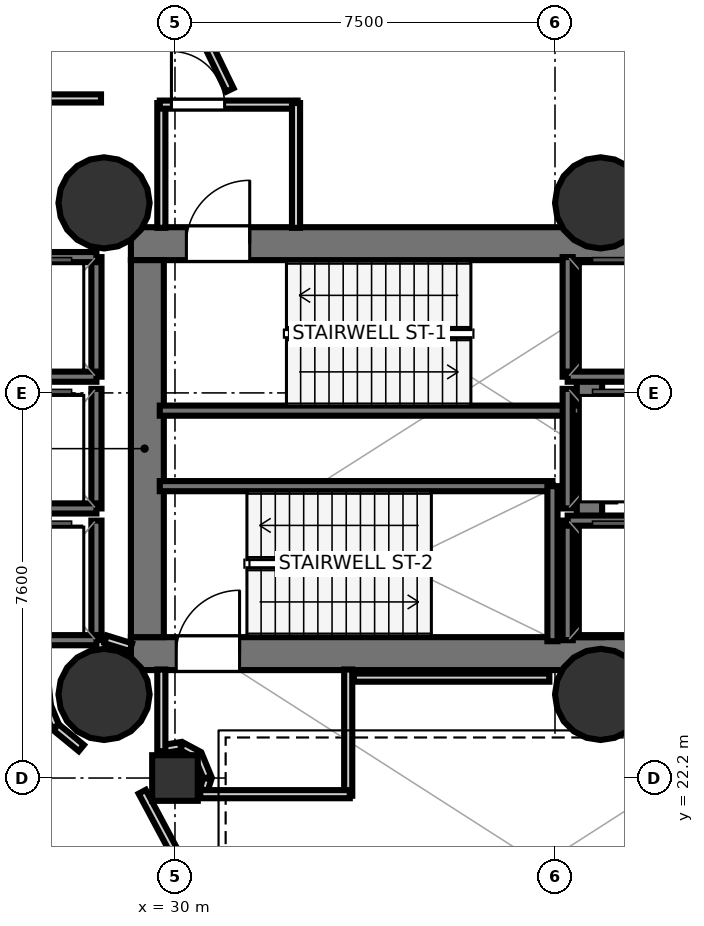
"""IFC4 building model, lengths in metres.
Left out: names, types, materials, properties, quantities, classifications, styles, units other than length and angle.
Written with IfcOpenShell. Run it as: python <this file> out.ifc"""

import sys

from ifc_helpers import new_model, si_unit, direction, frame, frame_2d, origin, origin_2d, place, context, subcontext, project, spatial, rectangle, hollow_circle, extrude, element, fill, save


model = new_model("IFC4")
c1 = context("Model", 3, precision=1e-05, world=origin(), true_north=direction((0.0, 1.0)))
c2 = subcontext(c1, "Body", "Model", "MODEL_VIEW")
j1 = project(units=[si_unit("LENGTHUNIT", "METRE"), si_unit("PLANEANGLEUNIT", "RADIAN")], contexts=[c1])
p1 = place(None, origin())
s1 = spatial("IfcSite", under=j1, at=p1, CompositionType="ELEMENT")
p2 = place(p1, origin())
s2 = spatial("IfcBuilding", under=s1, at=p2, CompositionType="ELEMENT")
p3 = place(p2, frame((0.0, 0.0, 11.0)))
s3 = spatial("IfcBuildingStorey", under=s2, at=p3, CompositionType="ELEMENT", Elevation=11.0)
p4 = place(p3, frame((29.13, 32.745, 0.0), z_axis=(0.0, 0.0, 1.0), x_axis=(1.0, 0.0, 0.0)))
e1 = element("IfcWall", 1, at=p4, inside=s3, PredefinedType="SHEAR", context=c2, shape_type="SweptSolid", body=[
    extrude(rectangle(XDim=10.72, YDim=0.65, at=frame_2d((5.36, 0.0))), origin(), (0.0, 0.0, 1.0), 4.58),
])
p5 = place(p4, frame((1.095, 0.0, 0.0)))
e2 = element("IfcOpeningElement", 2, at=p5, cuts=e1, PredefinedType="OPENING", context=c2, shape_type="SweptSolid", body=[
    extrude(rectangle(XDim=1.25, YDim=2.15, at=frame_2d((0.625, 1.075))), frame((0.0, 0.335, 0.0), z_axis=(0.0, -1.0, 0.0), x_axis=(1.0, 0.0, 0.0)), (0.0, 0.0, 1.0), 0.67),
])
p6 = place(p3, frame((29.13, 24.655, 0.0), z_axis=(0.0, 0.0, 1.0), x_axis=(1.0, 0.0, 0.0)))
e3 = element("IfcWall", 3, at=p6, inside=s3, PredefinedType="SHEAR", context=c2, shape_type="SweptSolid", body=[
    extrude(rectangle(XDim=10.72, YDim=0.65, at=frame_2d((5.36, 0.0))), origin(), (0.0, 0.0, 1.0), 4.58),
])
p7 = place(p6, frame((0.895, 0.0, 0.0)))
e4 = element("IfcOpeningElement", 4, at=p7, cuts=e3, PredefinedType="OPENING", context=c2, shape_type="SweptSolid", body=[
    extrude(rectangle(XDim=1.25, YDim=2.15, at=frame_2d((0.625, 1.075))), frame((0.0, 0.335, 0.0), z_axis=(0.0, -1.0, 0.0), x_axis=(1.0, 0.0, 0.0)), (0.0, 0.0, 1.0), 0.67),
])
p8 = place(p3, frame((29.455, 24.98, 0.0), z_axis=(0.0, 0.0, 1.0), x_axis=(0.0, 1.0, 0.0)))
e5 = element("IfcWall", 5, at=p8, inside=s3, PredefinedType="SHEAR", context=c2, shape_type="SweptSolid", body=[
    extrude(rectangle(XDim=7.44, YDim=0.65, at=frame_2d((3.72, 0.0))), origin(), (0.0, 0.0, 1.0), 4.58),
])
p9 = place(p3, frame((38.18, 24.98, 0.0), z_axis=(0.0, 0.0, 1.0), x_axis=(0.0, 1.0, 0.0)))
e6 = element("IfcWall", 6, at=p9, inside=s3, PredefinedType="SHEAR", context=c2, shape_type="SweptSolid", body=[
    extrude(rectangle(XDim=7.44, YDim=0.5, at=frame_2d((3.72, 0.0))), origin(), (0.0, 0.0, 1.0), 4.58),
])
for number, where, z_axis, x_axis in (
    (7, (28.6, 33.55, 0.0), (0.0, 0.0, 1.0), (1.0, 0.0, 0.0)),
    (8, (28.6, 23.85, 0.0), (0.0, 0.0, 1.0), (1.0, 0.0, 0.0)),
    (9, (38.4, 33.55, 0.0), (0.0, 0.0, 1.0), (1.0, 0.0, 0.0)),
    (10, (38.4, 23.85, 0.0), (0.0, 0.0, 1.0), (1.0, 0.0, 0.0)),
):
    element("IfcColumn", number, at=place(p3, frame(where, z_axis=z_axis, x_axis=x_axis)), inside=s3, PredefinedType="COLUMN", context=c2, shape_type="SweptSolid", body=[
        extrude(hollow_circle(Radius=0.9, WallThickness=0.045, at=origin_2d()), origin(), (0.0, 0.0, 1.0), 4.8),
    ])
p10 = place(p3, frame((30.0, 22.2, 0.0), z_axis=(0.0, 0.0, 1.0), x_axis=(1.0, 0.0, 0.0)))
e11 = element("IfcColumn", 11, at=p10, inside=s3, PredefinedType="COLUMN", context=c2, shape_type="SweptSolid", body=[
    extrude(rectangle(XDim=0.9, YDim=0.9, at=origin_2d()), origin(), (0.0, 0.0, 1.0), 4.8),
])
p11 = place(p3, frame((29.7, 29.45, 0.0), z_axis=(0.0, 0.0, 1.0), x_axis=(1.0, 0.0, 0.0)))
e12 = element("IfcWall", 12, at=p11, inside=s3, PredefinedType="SOLIDWALL", context=c2, shape_type="SweptSolid", body=[
    extrude(rectangle(XDim=8.3, YDim=0.2, at=frame_2d((4.15, 0.0))), origin(), (0.0, 0.0, 1.0), 4.58),
])
p12 = place(p3, frame((29.7, 27.96, 0.0), z_axis=(0.0, 0.0, 1.0), x_axis=(1.0, 0.0, 0.0)))
e13 = element("IfcWall", 13, at=p12, inside=s3, PredefinedType="SOLIDWALL", context=c2, shape_type="SweptSolid", body=[
    extrude(rectangle(XDim=7.75, YDim=0.2, at=frame_2d((3.875, 0.0))), origin(), (0.0, 0.0, 1.0), 4.58),
])
p13 = place(p3, frame((37.45, 24.9, 0.0), z_axis=(0.0, 0.0, 1.0), x_axis=(0.0, 1.0, 0.0)))
e14 = element("IfcWall", 14, at=p13, inside=s3, PredefinedType="SOLIDWALL", context=c2, shape_type="SweptSolid", body=[
    extrude(rectangle(XDim=3.06, YDim=0.2, at=frame_2d((1.53, 0.0))), origin(), (0.0, 0.0, 1.0), 4.58),
])
p14 = place(p3, frame((37.75, 30.12, 0.0), z_axis=(0.0, 0.0, 1.0), x_axis=(0.0, 1.0, 0.0)))
e15 = element("IfcWall", 15, at=p14, inside=s3, PredefinedType="SOLIDWALL", context=c2, shape_type="SweptSolid", body=[
    extrude(rectangle(XDim=2.36, YDim=0.2, at=frame_2d((1.18, 0.0))), origin(), (0.0, 0.0, 1.0), 4.58),
])
p15 = place(p3, frame((37.75, 30.12, 0.0), z_axis=(0.0, 0.0, 1.0), x_axis=(1.0, 0.0, 0.0)))
e16 = element("IfcWall", 16, at=p15, inside=s3, PredefinedType="SOLIDWALL", context=c2, shape_type="SweptSolid", body=[
    extrude(rectangle(XDim=2.1, YDim=0.2, at=frame_2d((1.05, 0.0))), origin(), (0.0, 0.0, 1.0), 4.58),
])
p16 = place(p3, frame((37.75, 24.92, 0.0), z_axis=(0.0, 0.0, 1.0), x_axis=(0.0, 1.0, 0.0)))
e17 = element("IfcWall", 17, at=p16, inside=s3, PredefinedType="SOLIDWALL", context=c2, shape_type="SweptSolid", body=[
    extrude(rectangle(XDim=2.36, YDim=0.2, at=frame_2d((1.18, 0.0))), origin(), (0.0, 0.0, 1.0), 4.58),
])
p17 = place(p3, frame((37.75, 27.28, 0.0), z_axis=(0.0, 0.0, 1.0), x_axis=(1.0, 0.0, 0.0)))
e18 = element("IfcWall", 18, at=p17, inside=s3, PredefinedType="SOLIDWALL", context=c2, shape_type="SweptSolid", body=[
    extrude(rectangle(XDim=2.1, YDim=0.2, at=frame_2d((1.05, 0.0))), origin(), (0.0, 0.0, 1.0), 4.58),
])
p18 = place(p3, frame((28.45, 30.12, 0.0), z_axis=(0.0, 0.0, 1.0), x_axis=(0.0, 1.0, 0.0)))
e19 = element("IfcWall", 19, at=p18, inside=s3, PredefinedType="SOLIDWALL", context=c2, shape_type="SweptSolid", body=[
    extrude(rectangle(XDim=2.36, YDim=0.2, at=frame_2d((1.18, 0.0))), origin(), (0.0, 0.0, 1.0), 4.58),
])
for number, where, z_axis, x_axis in (
    (20, (26.35, 32.48, 0.0), (0.0, 0.0, 1.0), (1.0, 0.0, 0.0)),
    (21, (26.35, 30.12, 0.0), (0.0, 0.0, 1.0), (1.0, 0.0, 0.0)),
):
    element("IfcWall", number, at=place(p3, frame(where, z_axis=z_axis, x_axis=x_axis)), inside=s3, PredefinedType="SOLIDWALL", context=c2, shape_type="SweptSolid", body=[
        extrude(rectangle(XDim=2.1, YDim=0.2, at=frame_2d((1.05, 0.0))), origin(), (0.0, 0.0, 1.0), 4.58),
    ])
p19 = place(p3, frame((28.45, 27.52, 0.0), z_axis=(0.0, 0.0, 1.0), x_axis=(0.0, 1.0, 0.0)))
e22 = element("IfcWall", 22, at=p19, inside=s3, PredefinedType="SOLIDWALL", context=c2, shape_type="SweptSolid", body=[
    extrude(rectangle(XDim=2.36, YDim=0.2, at=frame_2d((1.18, 0.0))), origin(), (0.0, 0.0, 1.0), 4.58),
])
p20 = place(p3, frame((26.35, 27.52, 0.0), z_axis=(0.0, 0.0, 1.0), x_axis=(1.0, 0.0, 0.0)))
e23 = element("IfcWall", 23, at=p20, inside=s3, PredefinedType="SOLIDWALL", context=c2, shape_type="SweptSolid", body=[
    extrude(rectangle(XDim=2.1, YDim=0.2, at=frame_2d((1.05, 0.0))), origin(), (0.0, 0.0, 1.0), 4.58),
])
p21 = place(p3, frame((28.45, 24.92, 0.0), z_axis=(0.0, 0.0, 1.0), x_axis=(0.0, 1.0, 0.0)))
e24 = element("IfcWall", 24, at=p21, inside=s3, PredefinedType="SOLIDWALL", context=c2, shape_type="SweptSolid", body=[
    extrude(rectangle(XDim=2.36, YDim=0.2, at=frame_2d((1.18, 0.0))), origin(), (0.0, 0.0, 1.0), 4.58),
])
p22 = place(p3, frame((26.35, 24.92, 0.0), z_axis=(0.0, 0.0, 1.0), x_axis=(1.0, 0.0, 0.0)))
e25 = element("IfcWall", 25, at=p22, inside=s3, PredefinedType="SOLIDWALL", context=c2, shape_type="SweptSolid", body=[
    extrude(rectangle(XDim=2.1, YDim=0.2, at=frame_2d((1.05, 0.0))), origin(), (0.0, 0.0, 1.0), 4.58),
])
p23 = place(p3, frame((37.75, 27.52, 0.0), z_axis=(0.0, 0.0, 1.0), x_axis=(0.0, 1.0, 0.0)))
e26 = element("IfcWall", 26, at=p23, inside=s3, PredefinedType="SOLIDWALL", context=c2, shape_type="SweptSolid", body=[
    extrude(rectangle(XDim=2.36, YDim=0.2, at=frame_2d((1.18, 0.0))), origin(), (0.0, 0.0, 1.0), 4.58),
])
p24 = place(p3, frame((29.731, 33.058, 0.0), z_axis=(0.0, 0.0, 1.0), x_axis=(0.0, 1.0, 0.0)))
e27 = element("IfcWall", 27, at=p24, inside=s3, PredefinedType="PARTITIONING", context=c2, shape_type="SweptSolid", body=[
    extrude(rectangle(XDim=2.462, YDim=0.16, at=frame_2d((1.231, 0.0))), origin(), (0.0, 0.0, 1.0), 3.1),
])
p25 = place(p3, frame((29.7, 35.489, 0.0), z_axis=(0.0, 0.0, 1.0), x_axis=(1.0, 0.0, 0.0)))
e28 = element("IfcWall", 28, at=p25, inside=s3, PredefinedType="PARTITIONING", context=c2, shape_type="SweptSolid", body=[
    extrude(rectangle(XDim=2.72, YDim=0.16, at=frame_2d((1.36, 0.0))), origin(), (0.0, 0.0, 1.0), 3.1),
])
p26 = place(p25, frame((0.23, 0.0, 0.0)))
e29 = element("IfcOpeningElement", 29, at=p26, cuts=e28, PredefinedType="OPENING", context=c2, shape_type="SweptSolid", body=[
    extrude(rectangle(XDim=1.05, YDim=2.15, at=frame_2d((0.525, 1.075))), frame((0.0, 0.09, 0.0), z_axis=(0.0, -1.0, 0.0), x_axis=(1.0, 0.0, 0.0)), (0.0, 0.0, 1.0), 0.18),
])
p27 = place(p3, frame((32.389, 35.52, 0.0), z_axis=(0.0, 0.0, 1.0), x_axis=(0.0, -1.0, 0.0)))
e30 = element("IfcWall", 30, at=p27, inside=s3, PredefinedType="PARTITIONING", context=c2, shape_type="SweptSolid", body=[
    extrude(rectangle(XDim=2.462, YDim=0.16, at=frame_2d((1.231, 0.0))), origin(), (0.0, 0.0, 1.0), 3.1),
])
p28 = place(p3, frame((30.569, 21.97, 0.0), z_axis=(0.0, 0.0, 1.0), x_axis=(0.304162531931, 0.952620152091, 0.0)))
e31 = element("IfcWall", 31, at=p28, inside=s3, PredefinedType="PARTITIONING", context=c2, shape_type="SweptSolid", body=[
    extrude(rectangle(XDim=0.231, YDim=0.16, at=frame_2d((0.116, 0.0))), origin(), (0.0, 0.0, 1.0), 3.1),
])
p29 = place(p3, frame((30.639, 22.212, 0.0), z_axis=(0.0, 0.0, 1.0), x_axis=(-0.382721202621, 0.923863886655, 0.0)))
e32 = element("IfcWall", 32, at=p29, inside=s3, PredefinedType="PARTITIONING", context=c2, shape_type="SweptSolid", body=[
    extrude(rectangle(XDim=0.467, YDim=0.16, at=frame_2d((0.233, 0.0))), origin(), (0.0, 0.0, 1.0), 3.1),
])
p30 = place(p3, frame((30.446, 22.659, 0.0), z_axis=(0.0, 0.0, 1.0), x_axis=(-0.881817981942, 0.471589913721, 0.0)))
e33 = element("IfcWall", 33, at=p30, inside=s3, PredefinedType="PARTITIONING", context=c2, shape_type="SweptSolid", body=[
    extrude(rectangle(XDim=0.354, YDim=0.16, at=frame_2d((0.177, 0.0))), origin(), (0.0, 0.0, 1.0), 3.1),
])
p31 = place(p3, frame((30.114, 22.829, 0.0), z_axis=(0.0, 0.0, 1.0), x_axis=(-0.986222627979, -0.165423480989, 0.0)))
e34 = element("IfcWall", 34, at=p31, inside=s3, PredefinedType="PARTITIONING", context=c2, shape_type="SweptSolid", body=[
    extrude(rectangle(XDim=0.425, YDim=0.16, at=frame_2d((0.212, 0.0))), origin(), (0.0, 0.0, 1.0), 3.1),
])
p32 = place(p3, frame((29.731, 22.728, 0.0), z_axis=(0.0, 0.0, 1.0), x_axis=(0.0, 1.0, 0.0)))
e35 = element("IfcWall", 35, at=p32, inside=s3, PredefinedType="PARTITIONING", context=c2, shape_type="SweptSolid", body=[
    extrude(rectangle(XDim=1.614, YDim=0.16, at=frame_2d((0.807, 0.0))), origin(), (0.0, 0.0, 1.0), 3.1),
])
p33 = place(p3, frame((33.419, 24.342, 0.0), z_axis=(0.0, 0.0, 1.0), x_axis=(0.0, -1.0, 0.0)))
e36 = element("IfcWall", 36, at=p33, inside=s3, PredefinedType="PARTITIONING", context=c2, shape_type="SweptSolid", body=[
    extrude(rectangle(XDim=2.492, YDim=0.16, at=frame_2d((1.246, 0.0))), origin(), (0.0, 0.0, 1.0), 3.1),
])
p34 = place(p3, frame((33.45, 21.881, 0.0), z_axis=(0.0, 0.0, 1.0), x_axis=(-1.0, 0.0, 0.0)))
e37 = element("IfcWall", 37, at=p34, inside=s3, PredefinedType="PARTITIONING", context=c2, shape_type="SweptSolid", body=[
    extrude(rectangle(XDim=2.952, YDim=0.16, at=frame_2d((1.476, 0.0))), origin(), (0.0, 0.0, 1.0), 3.1),
])
p35 = place(p3, frame((29.13, 24.782, 0.0), z_axis=(0.0, 0.0, 1.0), x_axis=(-0.955000482512, 0.296604245422, 0.0)))
e38 = element("IfcWall", 38, at=p35, inside=s3, PredefinedType="PARTITIONING", context=c2, shape_type="SweptSolid", body=[
    extrude(rectangle(XDim=0.524, YDim=0.16, at=frame_2d((0.262, 0.0))), origin(), (0.0, 0.0, 1.0), 3.1),
])
p36 = place(p3, frame((37.389, 24.181, 0.0), z_axis=(0.0, 0.0, 1.0), x_axis=(-1.0, 0.0, 0.0)))
e39 = element("IfcWall", 39, at=p36, inside=s3, PredefinedType="PARTITIONING", context=c2, shape_type="SweptSolid", body=[
    extrude(rectangle(XDim=3.859, YDim=0.16, at=frame_2d((1.929, 0.0))), origin(), (0.0, 0.0, 1.0), 3.1),
])
p37 = place(p3, frame((30.258, 37.487, 0.0), z_axis=(0.0, 0.0, 1.0), x_axis=(0.435698821732, -0.900092515657, 0.0)))
e40 = element("IfcWall", 40, at=p37, inside=s3, PredefinedType="PARTITIONING", context=c2, shape_type="SweptSolid", body=[
    extrude(rectangle(XDim=1.897, YDim=0.16, at=frame_2d((0.949, 0.0))), origin(), (0.0, 0.0, 1.0), 3.1),
])
p38 = place(p3, frame((28.54, 35.611, 0.0), z_axis=(0.0, 0.0, 1.0), x_axis=(-1.0, 0.0, 0.0)))
e41 = element("IfcWall", 41, at=p38, inside=s3, PredefinedType="PARTITIONING", context=c2, shape_type="SweptSolid", body=[
    extrude(rectangle(XDim=1.69, YDim=0.16, at=frame_2d((0.845, 0.0))), origin(), (0.0, 0.0, 1.0), 3.1),
])
p39 = place(p3, frame((27.473, 23.62, 0.0), z_axis=(0.0, 0.0, 1.0), x_axis=(0.382631351728, -0.923901103298, 0.0)))
e42 = element("IfcWall", 42, at=p39, inside=s3, PredefinedType="PARTITIONING", context=c2, shape_type="SweptSolid", body=[
    extrude(rectangle(XDim=0.437, YDim=0.16, at=frame_2d((0.219, 0.0))), origin(), (0.0, 0.0, 1.0), 3.1),
])
p40 = place(p3, frame((27.649, 23.204, 0.0), z_axis=(0.0, 0.0, 1.0), x_axis=(0.772818338666, -0.634627304346, 0.0)))
e43 = element("IfcWall", 43, at=p40, inside=s3, PredefinedType="PARTITIONING", context=c2, shape_type="SweptSolid", body=[
    extrude(rectangle(XDim=0.65, YDim=0.16, at=frame_2d((0.325, 0.0))), origin(), (0.0, 0.0, 1.0), 3.1),
])
p41 = place(p3, frame((29.354, 21.929, 0.0), z_axis=(0.0, 0.0, 1.0), x_axis=(0.471375681313, -0.881932518432, 0.0)))
e44 = element("IfcWall", 44, at=p41, inside=s3, PredefinedType="PARTITIONING", context=c2, shape_type="SweptSolid", body=[
    extrude(rectangle(XDim=2.059, YDim=0.16, at=frame_2d((1.03, 0.0))), origin(), (0.0, 0.0, 1.0), 3.1),
])
p42 = place(p3, frame((27.919, 20.397, 0.0), z_axis=(0.0, 0.0, 1.0), x_axis=(-0.932053116436, 0.362321663915, 0.0)))
e45 = element("IfcWall", 45, at=p42, inside=s3, PredefinedType="PARTITIONING", context=c2, shape_type="SweptSolid", body=[
    extrude(rectangle(XDim=1.135, YDim=0.16, at=frame_2d((0.567, 0.0))), origin(), (0.0, 0.0, 1.0), 3.1),
])
p43 = place(p5, origin())
e46 = element("IfcDoor", 46, at=p43, inside=s3, OperationType="SINGLE_SWING_RIGHT", PredefinedType="DOOR", context=c2, shape_type="SweptSolid", body=[
    extrude(rectangle(XDim=1.25, YDim=2.15, at=frame_2d((0.625, 1.075))), frame((0.0, 0.025, 0.0), z_axis=(0.0, -1.0, 0.0), x_axis=(1.0, 0.0, 0.0)), (0.0, 0.0, 1.0), 0.05),
])
fill(e2, e46)
p44 = place(p7, origin())
e47 = element("IfcDoor", 47, at=p44, inside=s3, OperationType="SINGLE_SWING_RIGHT", PredefinedType="DOOR", context=c2, shape_type="SweptSolid", body=[
    extrude(rectangle(XDim=1.25, YDim=2.15, at=frame_2d((0.625, 1.075))), frame((0.0, 0.025, 0.0), z_axis=(0.0, -1.0, 0.0), x_axis=(1.0, 0.0, 0.0)), (0.0, 0.0, 1.0), 0.05),
])
fill(e4, e47)
p45 = place(p26, origin())
e48 = element("IfcDoor", 48, at=p45, inside=s3, OperationType="SINGLE_SWING_LEFT", PredefinedType="DOOR", context=c2, shape_type="SweptSolid", body=[
    extrude(rectangle(XDim=1.05, YDim=2.15, at=frame_2d((0.525, 1.075))), frame((0.0, 0.025, 0.0), z_axis=(0.0, -1.0, 0.0), x_axis=(1.0, 0.0, 0.0)), (0.0, 0.0, 1.0), 0.05),
])
fill(e29, e48)
save(model, sys.argv[1])
